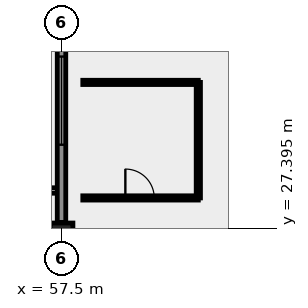
"""IFC4 building model, lengths in metres.
Left out: names, types, materials, properties, quantities, classifications, styles, units other than length and angle.
Written with IfcOpenShell. Run it as: python <this file> out.ifc"""

import sys

from ifc_helpers import new_model, si_unit, direction, frame, frame_2d, origin, origin_2d, place, context, subcontext, project, spatial, rectangle, circle, extrude, element, fill, save


model = new_model("IFC4")
c1 = context("Model", 3, precision=1e-05, world=origin(), true_north=direction((0.0, 1.0)))
c2 = subcontext(c1, "Body", "Model", "MODEL_VIEW")
j1 = project(units=[si_unit("LENGTHUNIT", "METRE"), si_unit("PLANEANGLEUNIT", "RADIAN")], contexts=[c1])
p1 = place(None, origin())
s1 = spatial("IfcSite", under=j1, at=p1, CompositionType="ELEMENT")
p2 = place(p1, origin())
s2 = spatial("IfcBuilding", under=s1, at=p2, CompositionType="ELEMENT")
p3 = place(p2, frame((0.0, 0.0, 13.8)))
s3 = spatial("IfcBuildingStorey", under=s2, at=p3, CompositionType="ELEMENT", Elevation=13.8)
p4 = place(p3, frame((57.5, 27.2, 0.0), z_axis=(0.0, 0.0, 1.0), x_axis=(1.0, 0.0, 0.0)))
e1 = element("IfcColumn", 1, at=p4, inside=s3, PredefinedType="COLUMN", context=c2, shape_type="SweptSolid", body=[
    extrude(circle(Radius=0.375, at=origin_2d()), origin(), (0.0, 0.0, 1.0), 4.5),
])
p5 = place(p3, frame((57.5, 27.595, 0.0), z_axis=(0.0, 0.0, 1.0), x_axis=(0.0, 1.0, 0.0)))
e2 = element("IfcWall", 2, at=p5, inside=s3, PredefinedType="SOLIDWALL", context=c2, shape_type="SweptSolid", body=[
    extrude(rectangle(XDim=8.01, YDim=0.28, at=frame_2d((4.005, 0.0))), origin(), (0.0, 0.0, 1.0), 3.35),
])
p6 = place(p5, frame((2.555, 0.0, 0.85)))
e3 = element("IfcOpeningElement", 3, at=p6, cuts=e2, PredefinedType="OPENING", context=c2, shape_type="SweptSolid", body=[
    extrude(rectangle(XDim=2.9, YDim=2.25, at=frame_2d((1.45, 1.125))), frame((0.0, 0.15, 0.0), z_axis=(0.0, -1.0, 0.0), x_axis=(1.0, 0.0, 0.0)), (0.0, 0.0, 1.0), 0.3),
])
p7 = place(p3, frame((58.2, 28.4, 0.0), z_axis=(0.0, 0.0, 1.0), x_axis=(1.0, 0.0, 0.0)))
e4 = element("IfcWall", 4, at=p7, inside=s3, PredefinedType="PLUMBINGWALL", context=c2, shape_type="SweptSolid", body=[
    extrude(rectangle(XDim=3.8, YDim=0.14, at=frame_2d((1.9, 0.0))), origin(), (0.0, 0.0, 1.0), 4.22),
])
p8 = place(p7, frame((1.4, 0.0, 0.0)))
e5 = element("IfcOpeningElement", 5, at=p8, cuts=e4, PredefinedType="OPENING", context=c2, shape_type="SweptSolid", body=[
    extrude(rectangle(XDim=0.95, YDim=2.1, at=frame_2d((0.475, 1.05))), frame((0.0, 0.08, 0.0), z_axis=(0.0, -1.0, 0.0), x_axis=(1.0, 0.0, 0.0)), (0.0, 0.0, 1.0), 0.16),
])
for number, where, z_axis, x_axis in (
    (6, (62.0, 28.4, 0.0), (0.0, 0.0, 1.0), (0.0, 1.0, 0.0)),
    (7, (58.2, 32.2, 0.0), (0.0, 0.0, 1.0), (1.0, 0.0, 0.0)),
):
    element("IfcWall", number, at=place(p3, frame(where, z_axis=z_axis, x_axis=x_axis)), inside=s3, PredefinedType="PLUMBINGWALL", context=c2, shape_type="SweptSolid", body=[
        extrude(rectangle(XDim=3.8, YDim=0.14, at=frame_2d((1.9, 0.0))), origin(), (0.0, 0.0, 1.0), 4.22),
    ])
p9 = place(p6, origin())
e8 = element("IfcWindow", 8, at=p9, inside=s3, PartitioningType="SINGLE_PANEL", PredefinedType="WINDOW", context=c2, shape_type="SweptSolid", body=[
    extrude(rectangle(XDim=2.9, YDim=2.25, at=frame_2d((1.45, 1.125))), frame((0.0, 0.03, 0.0), z_axis=(0.0, -1.0, 0.0), x_axis=(1.0, 0.0, 0.0)), (0.0, 0.0, 1.0), 0.06),
])
fill(e3, e8)
p10 = place(p8, origin())
e9 = element("IfcDoor", 9, at=p10, inside=s3, OperationType="SINGLE_SWING_LEFT", PredefinedType="DOOR", context=c2, shape_type="SweptSolid", body=[
    extrude(rectangle(XDim=0.95, YDim=2.1, at=frame_2d((0.475, 1.05))), frame((0.0, 0.025, 0.0), z_axis=(0.0, -1.0, 0.0), x_axis=(1.0, 0.0, 0.0)), (0.0, 0.0, 1.0), 0.05),
])
fill(e5, e9)
save(model, sys.argv[1])
